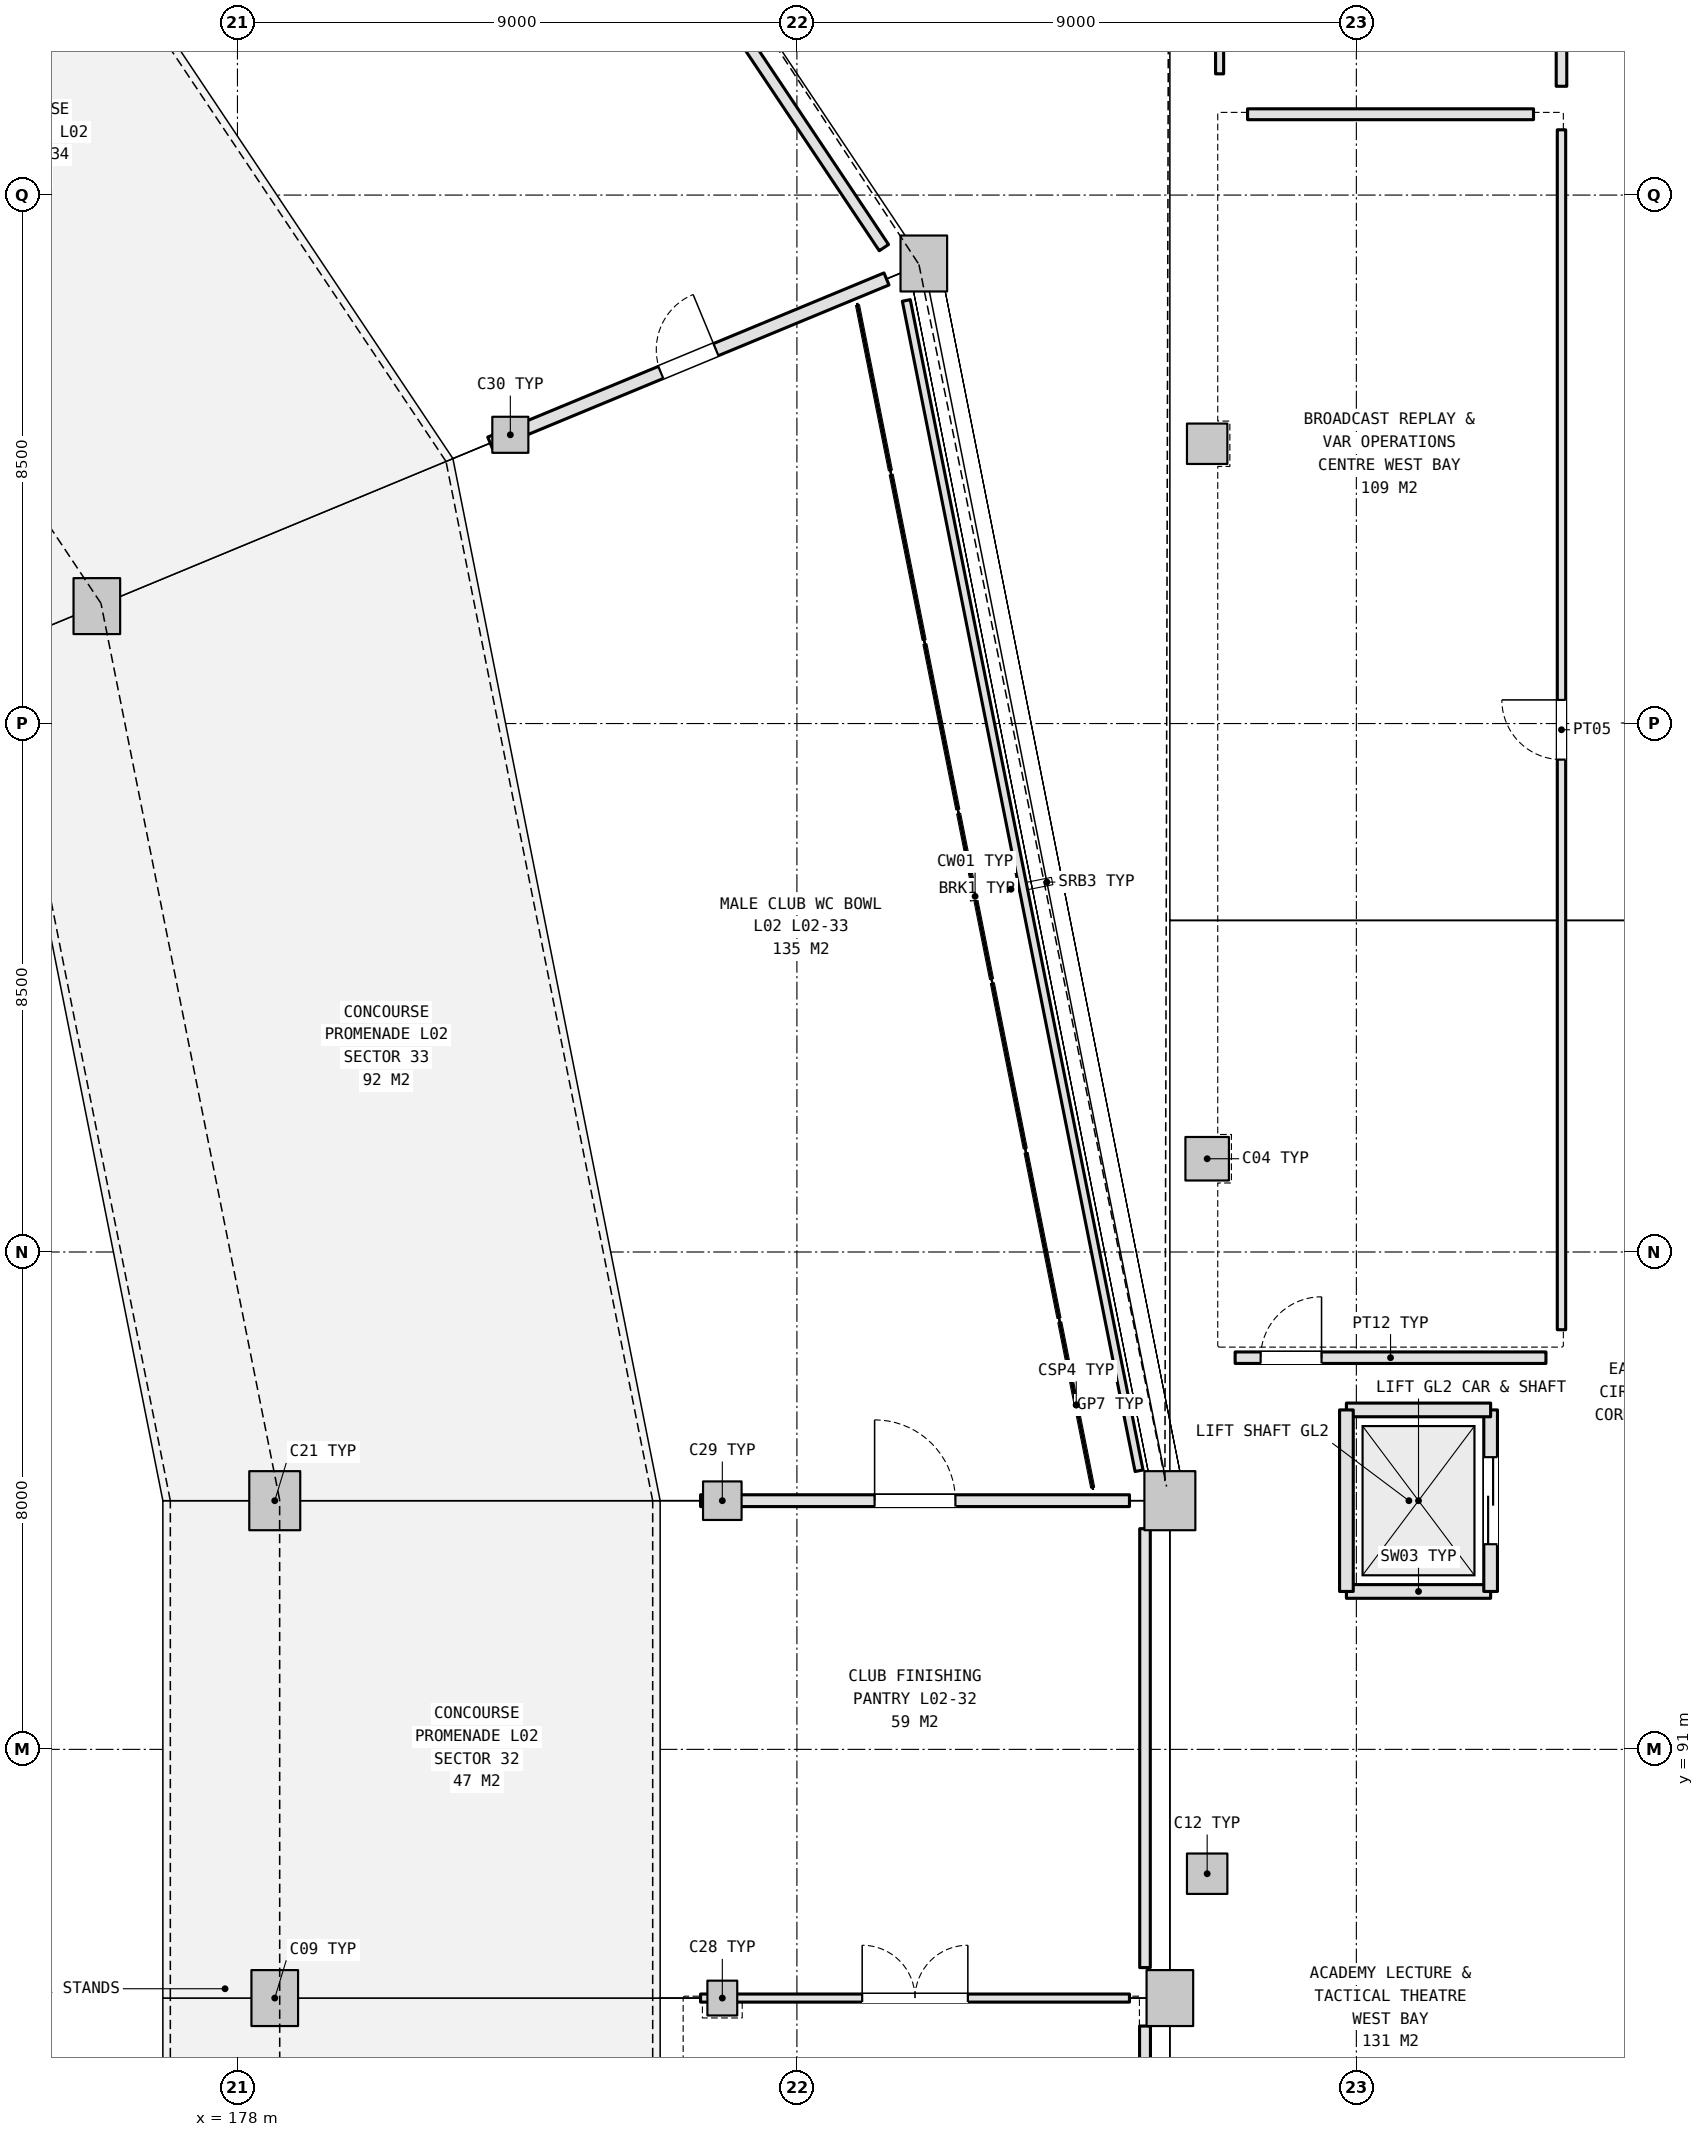
"""IFC4 building model, lengths in metres.
Left out: names, types, materials, properties, quantities, classifications, styles, units other than length and angle.
Written with IfcOpenShell. Run it as: python <this file> out.ifc"""

import sys

from ifc_helpers import new_model, si_unit, direction, frame, frame_2d, origin, origin_2d, place, context, subcontext, project, spatial, rectangle, extrude, element, fill, save


model = new_model("IFC4")
c1 = context("Model", 3, precision=1e-05, world=origin(), true_north=direction((0.0, 1.0)))
c2 = subcontext(c1, "Body", "Model", "MODEL_VIEW")
j1 = project(units=[si_unit("LENGTHUNIT", "METRE"), si_unit("PLANEANGLEUNIT", "RADIAN")], contexts=[c1])
p1 = place(None, origin())
s1 = spatial("IfcSite", under=j1, at=p1, CompositionType="ELEMENT")
p2 = place(p1, origin())
s2 = spatial("IfcBuilding", under=s1, at=p2, CompositionType="ELEMENT")
p3 = place(p2, frame((0.0, 0.0, 10.8)))
s3 = spatial("IfcBuildingStorey", under=s2, at=p3, CompositionType="ELEMENT", Elevation=10.8)
p4 = place(p3, frame((178.6, 87.0, 0.0), z_axis=(0.0, 0.0, 1.0), x_axis=(1.0, 0.0, 0.0)))
e1 = element("IfcColumn", 1, at=p4, inside=s3, PredefinedType="COLUMN", context=c2, shape_type="SweptSolid", body=[
    extrude(rectangle(XDim=0.75, YDim=0.9, at=origin_2d()), origin(), (0.0, 0.0, 1.0), 5.4),
])
p5 = place(p3, frame((185.8, 87.0, 0.0), z_axis=(0.0, 0.0, 1.0), x_axis=(1.0, 0.0, 0.0)))
e2 = element("IfcColumn", 2, at=p5, inside=s3, PredefinedType="COLUMN", context=c2, shape_type="SweptSolid", body=[
    extrude(rectangle(XDim=0.48, YDim=0.56, at=origin_2d()), origin(), (0.0, 0.0, 1.0), 5.4),
])
p6 = place(p3, frame((193.0, 87.0, 0.0), z_axis=(0.0, 0.0, 1.0), x_axis=(1.0, 0.0, 0.0)))
e3 = element("IfcColumn", 3, at=p6, inside=s3, PredefinedType="COLUMN", context=c2, shape_type="SweptSolid", body=[
    extrude(rectangle(XDim=0.75, YDim=0.9, at=origin_2d()), origin(), (0.0, 0.0, 1.0), 5.4),
])
p7 = place(p3, frame((178.6, 95.0, 0.0), z_axis=(0.0, 0.0, 1.0), x_axis=(1.0, 0.0, 0.0)))
e4 = element("IfcColumn", 4, at=p7, inside=s3, PredefinedType="COLUMN", context=c2, shape_type="SweptSolid", body=[
    extrude(rectangle(XDim=0.82, YDim=0.95, at=origin_2d()), origin(), (0.0, 0.0, 1.0), 5.4),
])
p8 = place(p3, frame((185.8, 95.0, 0.0), z_axis=(0.0, 0.0, 1.0), x_axis=(1.0, 0.0, 0.0)))
e5 = element("IfcColumn", 5, at=p8, inside=s3, PredefinedType="COLUMN", context=c2, shape_type="SweptSolid", body=[
    extrude(rectangle(XDim=0.62, YDim=0.62, at=origin_2d()), origin(), (0.0, 0.0, 1.0), 5.4),
])
p9 = place(p3, frame((193.0, 95.0, 0.0), z_axis=(0.0, 0.0, 1.0), x_axis=(1.0, 0.0, 0.0)))
e6 = element("IfcColumn", 6, at=p9, inside=s3, PredefinedType="COLUMN", context=c2, shape_type="SweptSolid", body=[
    extrude(rectangle(XDim=0.82, YDim=0.95, at=origin_2d()), origin(), (0.0, 0.0, 1.0), 5.4),
])
p10 = place(p3, frame((175.738, 109.389, 0.0), z_axis=(0.0, 0.0, 1.0), x_axis=(1.0, 0.0, 0.0)))
e7 = element("IfcColumn", 7, at=p10, inside=s3, PredefinedType="COLUMN", context=c2, shape_type="SweptSolid", body=[
    extrude(rectangle(XDim=0.75, YDim=0.9, at=origin_2d()), origin(), (0.0, 0.0, 1.0), 5.4),
])
p11 = place(p3, frame((182.39, 112.144, 0.0), z_axis=(0.0, 0.0, 1.0), x_axis=(1.0, 0.0, 0.0)))
e8 = element("IfcColumn", 8, at=p11, inside=s3, PredefinedType="COLUMN", context=c2, shape_type="SweptSolid", body=[
    extrude(rectangle(XDim=0.58, YDim=0.58, at=origin_2d()), origin(), (0.0, 0.0, 1.0), 5.4),
])
p12 = place(p3, frame((189.042, 114.9, 0.0), z_axis=(0.0, 0.0, 1.0), x_axis=(1.0, 0.0, 0.0)))
e9 = element("IfcColumn", 9, at=p12, inside=s3, PredefinedType="COLUMN", context=c2, shape_type="SweptSolid", body=[
    extrude(rectangle(XDim=0.75, YDim=0.9, at=origin_2d()), origin(), (0.0, 0.0, 1.0), 5.4),
])
p13 = place(p3, frame((193.6, 89.0, 0.0), z_axis=(0.0, 0.0, 1.0), x_axis=(1.0, 0.0, 0.0)))
e10 = element("IfcColumn", 10, at=p13, inside=s3, PredefinedType="COLUMN", context=c2, shape_type="SweptSolid", body=[
    extrude(rectangle(XDim=0.65, YDim=0.65, at=origin_2d()), origin(), (0.0, 0.0, 1.0), 5.4),
])
p14 = place(p3, frame((193.6, 100.5, 0.0), z_axis=(0.0, 0.0, 1.0), x_axis=(1.0, 0.0, 0.0)))
e11 = element("IfcColumn", 11, at=p14, inside=s3, PredefinedType="COLUMN", context=c2, shape_type="SweptSolid", body=[
    extrude(rectangle(XDim=0.7, YDim=0.7, at=origin_2d()), origin(), (0.0, 0.0, 1.0), 5.4),
])
p15 = place(p3, frame((193.6, 112.0, 0.0), z_axis=(0.0, 0.0, 1.0), x_axis=(1.0, 0.0, 0.0)))
e12 = element("IfcColumn", 12, at=p15, inside=s3, PredefinedType="COLUMN", context=c2, shape_type="SweptSolid", body=[
    extrude(rectangle(XDim=0.65, YDim=0.65, at=origin_2d()), origin(), (0.0, 0.0, 1.0), 5.4),
])
p16 = place(p3, frame((195.84, 93.54, 0.0), z_axis=(0.0, 0.0, 1.0), x_axis=(1.0, 0.0, 0.0)))
e13 = element("IfcWall", 13, at=p16, inside=s3, PredefinedType="SHEAR", context=c2, shape_type="SweptSolid", body=[
    extrude(rectangle(XDim=2.32, YDim=0.22, at=frame_2d((1.16, 0.0))), origin(), (0.0, 0.0, 1.0), 5.15),
])
p17 = place(p3, frame((198.16, 93.54, 0.0), z_axis=(0.0, 0.0, 1.0), x_axis=(0.0, 1.0, 0.0)))
e14 = element("IfcWall", 14, at=p17, inside=s3, PredefinedType="SHEAR", context=c2, shape_type="SweptSolid", body=[
    extrude(rectangle(XDim=2.92, YDim=0.22, at=frame_2d((1.46, 0.0))), origin(), (0.0, 0.0, 1.0), 5.15),
])
p18 = place(p17, frame((0.76, 0.0, 0.0)))
e15 = element("IfcOpeningElement", 15, at=p18, cuts=e14, PredefinedType="OPENING", context=c2, shape_type="SweptSolid", body=[
    extrude(rectangle(XDim=1.4, YDim=2.3, at=frame_2d((0.7, 1.15))), frame((0.0, 0.12, 0.0), z_axis=(0.0, -1.0, 0.0), x_axis=(1.0, 0.0, 0.0)), (0.0, 0.0, 1.0), 0.24),
])
p19 = place(p3, frame((198.16, 96.46, 0.0), z_axis=(0.0, 0.0, 1.0), x_axis=(-1.0, 0.0, 0.0)))
e16 = element("IfcWall", 16, at=p19, inside=s3, PredefinedType="SHEAR", context=c2, shape_type="SweptSolid", body=[
    extrude(rectangle(XDim=2.32, YDim=0.22, at=frame_2d((1.16, 0.0))), origin(), (0.0, 0.0, 1.0), 5.15),
])
p20 = place(p3, frame((195.84, 96.46, 0.0), z_axis=(0.0, 0.0, 1.0), x_axis=(0.0, -1.0, 0.0)))
e17 = element("IfcWall", 17, at=p20, inside=s3, PredefinedType="SHEAR", context=c2, shape_type="SweptSolid", body=[
    extrude(rectangle(XDim=2.92, YDim=0.22, at=frame_2d((1.46, 0.0))), origin(), (0.0, 0.0, 1.0), 5.15),
])
p21 = place(p3, frame((194.05, 97.3, 0.0), z_axis=(0.0, 0.0, 1.0), x_axis=(1.0, 0.0, 0.0)))
e18 = element("IfcWall", 18, at=p21, inside=s3, PredefinedType="PARTITIONING", context=c2, shape_type="SweptSolid", body=[
    extrude(rectangle(XDim=5.0, YDim=0.185, at=frame_2d((2.5, 0.0))), origin(), (0.0, 0.0, 1.0), 5.12),
])
p22 = place(p21, frame((0.41, 0.0, 0.0)))
e19 = element("IfcOpeningElement", 19, at=p22, cuts=e18, PredefinedType="OPENING", context=c2, shape_type="SweptSolid", body=[
    extrude(rectangle(XDim=0.98, YDim=2.15, at=frame_2d((0.49, 1.075))), frame((0.0, 0.103, 0.0), z_axis=(0.0, -1.0, 0.0), x_axis=(1.0, 0.0, 0.0)), (0.0, 0.0, 1.0), 0.205),
])
p23 = place(p3, frame((199.3, 117.05, 0.0), z_axis=(0.0, 0.0, 1.0), x_axis=(0.0, -1.0, 0.0)))
e20 = element("IfcWall", 20, at=p23, inside=s3, PredefinedType="PARTITIONING", context=c2, shape_type="SweptSolid", body=[
    extrude(rectangle(XDim=19.3, YDim=0.135, at=frame_2d((9.65, 0.0))), origin(), (0.0, 0.0, 1.0), 4.605),
])
p24 = place(p23, frame((9.17, 0.0, 0.0)))
e21 = element("IfcOpeningElement", 21, at=p24, cuts=e20, PredefinedType="OPENING", context=c2, shape_type="SweptSolid", body=[
    extrude(rectangle(XDim=0.96, YDim=2.15, at=frame_2d((0.48, 1.075))), frame((0.0, 0.077, 0.0), z_axis=(0.0, -1.0, 0.0), x_axis=(1.0, 0.0, 0.0)), (0.0, 0.0, 1.0), 0.155),
])
p25 = place(p3, frame((194.25, 117.3, 0.0), z_axis=(0.0, 0.0, 1.0), x_axis=(1.0, 0.0, 0.0)))
e22 = element("IfcWall", 22, at=p25, inside=s3, PredefinedType="PARTITIONING", context=c2, shape_type="SweptSolid", body=[
    extrude(rectangle(XDim=4.6, YDim=0.175, at=frame_2d((2.3, 0.0))), origin(), (0.0, 0.0, 1.0), 5.12),
])
p26 = place(p3, frame((199.3, 131.05, 0.0), z_axis=(0.0, 0.0, 1.0), x_axis=(0.0, -1.0, 0.0)))
e23 = element("IfcWall", 23, at=p26, inside=s3, PredefinedType="PARTITIONING", context=c2, shape_type="SweptSolid", body=[
    extrude(rectangle(XDim=13.3, YDim=0.17, at=frame_2d((6.65, 0.0))), origin(), (0.0, 0.0, 1.0), 4.605),
])
p27 = place(p26, frame((6.175, 0.0, 0.0)))
e24 = element("IfcOpeningElement", 24, at=p27, cuts=e23, PredefinedType="OPENING", context=c2, shape_type="SweptSolid", body=[
    extrude(rectangle(XDim=0.95, YDim=2.15, at=frame_2d((0.475, 1.075))), frame((0.0, 0.095, 0.0), z_axis=(0.0, -1.0, 0.0), x_axis=(1.0, 0.0, 0.0)), (0.0, 0.0, 1.0), 0.19),
])
p28 = place(p3, frame((193.8, 117.95, 0.0), z_axis=(0.0, 0.0, 1.0), x_axis=(0.0, 1.0, 0.0)))
e25 = element("IfcWall", 25, at=p28, inside=s3, PredefinedType="PARTITIONING", context=c2, shape_type="SweptSolid", body=[
    extrude(rectangle(XDim=12.9, YDim=0.13, at=frame_2d((6.45, 0.0))), origin(), (0.0, 0.0, 1.0), 4.455),
])
p29 = place(p3, frame((185.45, 87.0, 0.0), z_axis=(0.0, 0.0, 1.0), x_axis=(1.0, 0.0, 0.0)))
e26 = element("IfcWall", 26, at=p29, inside=s3, PredefinedType="PARTITIONING", context=c2, shape_type="SweptSolid", body=[
    extrude(rectangle(XDim=6.9, YDim=0.13, at=frame_2d((3.45, 0.0))), origin(), (0.0, 0.0, 1.0), 4.255),
])
p30 = place(p29, frame((2.6, 0.0, 0.0)))
e27 = element("IfcOpeningElement", 27, at=p30, cuts=e26, PredefinedType="OPENING", context=c2, shape_type="SweptSolid", body=[
    extrude(rectangle(XDim=1.7, YDim=2.25, at=frame_2d((0.85, 1.125))), frame((0.0, 0.075, 0.0), z_axis=(0.0, -1.0, 0.0), x_axis=(1.0, 0.0, 0.0)), (0.0, 0.0, 1.0), 0.15),
])
p31 = place(p3, frame((192.6, 86.55, 0.0), z_axis=(0.0, 0.0, 1.0), x_axis=(0.0, -1.0, 0.0)))
e28 = element("IfcWall", 28, at=p31, inside=s3, PredefinedType="PARTITIONING", context=c2, shape_type="SweptSolid", body=[
    extrude(rectangle(XDim=7.06, YDim=0.175, at=frame_2d((3.53, 0.0))), origin(), (0.0, 0.0, 1.0), 5.12),
])
p32 = place(p3, frame((185.45, 95.0, 0.0), z_axis=(0.0, 0.0, 1.0), x_axis=(1.0, 0.0, 0.0)))
e29 = element("IfcWall", 29, at=p32, inside=s3, PredefinedType="PARTITIONING", context=c2, shape_type="SweptSolid", body=[
    extrude(rectangle(XDim=6.9, YDim=0.19, at=frame_2d((3.45, 0.0))), origin(), (0.0, 0.0, 1.0), 4.285),
])
p33 = place(p32, frame((2.8, 0.0, 0.0)))
e30 = element("IfcOpeningElement", 30, at=p33, cuts=e29, PredefinedType="OPENING", context=c2, shape_type="SweptSolid", body=[
    extrude(rectangle(XDim=1.3, YDim=2.2, at=frame_2d((0.65, 1.1))), frame((0.0, 0.105, 0.0), z_axis=(0.0, -1.0, 0.0), x_axis=(1.0, 0.0, 0.0)), (0.0, 0.0, 1.0), 0.21),
])
p34 = place(p3, frame((192.6, 94.55, 0.0), z_axis=(0.0, 0.0, 1.0), x_axis=(0.0, -1.0, 0.0)))
e31 = element("IfcWall", 31, at=p34, inside=s3, PredefinedType="PARTITIONING", context=c2, shape_type="SweptSolid", body=[
    extrude(rectangle(XDim=7.06, YDim=0.17, at=frame_2d((3.53, 0.0))), origin(), (0.0, 0.0, 1.0), 5.12),
])
p35 = place(p3, frame((182.066, 112.01, 0.0), z_axis=(0.0, 0.0, 1.0), x_axis=(0.923873656974, 0.38269761686, 0.0)))
e32 = element("IfcWall", 32, at=p35, inside=s3, PredefinedType="PLUMBINGWALL", context=c2, shape_type="SweptSolid", body=[
    extrude(rectangle(XDim=6.9, YDim=0.21, at=frame_2d((3.45, 0.0))), origin(), (0.0, 0.0, 1.0), 4.215),
])
p36 = place(p35, frame((2.97, 0.0, 0.0)))
e33 = element("IfcOpeningElement", 33, at=p36, cuts=e32, PredefinedType="OPENING", context=c2, shape_type="SweptSolid", body=[
    extrude(rectangle(XDim=0.96, YDim=2.15, at=frame_2d((0.48, 1.075))), frame((0.0, 0.115, 0.0), z_axis=(0.0, -1.0, 0.0), x_axis=(1.0, 0.0, 0.0)), (0.0, 0.0, 1.0), 0.23),
])
p37 = place(p3, frame((188.76, 114.305, 0.0), z_axis=(0.0, 0.0, 1.0), x_axis=(0.195083697793, -0.98078659802, 0.0)))
e34 = element("IfcWall", 34, at=p37, inside=s3, PredefinedType="PARTITIONING", context=c2, shape_type="SweptSolid", body=[
    extrude(rectangle(XDim=19.192, YDim=0.13, at=frame_2d((9.596, 0.0))), origin(), (0.0, 0.0, 1.0), 5.12),
])
p38 = place(p3, frame((177.737, 131.113, 0.0), z_axis=(0.0, 0.0, 1.0), x_axis=(0.555562946988, -0.831474480627, 0.0)))
e35 = element("IfcWall", 35, at=p38, inside=s3, PredefinedType="PARTITIONING", context=c2, shape_type="SweptSolid", body=[
    extrude(rectangle(XDim=19.192, YDim=0.18, at=frame_2d((9.596, 0.0))), origin(), (0.0, 0.0, 1.0), 5.12),
])
p39 = place(p18, origin())
e36 = element("IfcDoor", 36, at=p39, inside=s3, OperationType="DOUBLE_DOOR_SLIDING", PredefinedType="DOOR", context=c2, shape_type="SweptSolid", body=[
    extrude(rectangle(XDim=1.4, YDim=2.3, at=frame_2d((0.7, 1.15))), frame((0.0, 0.025, 0.0), z_axis=(0.0, -1.0, 0.0), x_axis=(1.0, 0.0, 0.0)), (0.0, 0.0, 1.0), 0.05),
])
fill(e15, e36)
p40 = place(p22, origin())
e37 = element("IfcDoor", 37, at=p40, inside=s3, OperationType="SINGLE_SWING_RIGHT", PredefinedType="DOOR", context=c2, shape_type="SweptSolid", body=[
    extrude(rectangle(XDim=0.98, YDim=2.15, at=frame_2d((0.49, 1.075))), frame((0.0, 0.025, 0.0), z_axis=(0.0, -1.0, 0.0), x_axis=(1.0, 0.0, 0.0)), (0.0, 0.0, 1.0), 0.05),
])
fill(e19, e37)
p41 = place(p24, frame((0.96, 0.0, 0.0), z_axis=(0.0, 0.0, 1.0), x_axis=(-1.0, 0.0, 0.0)))
e38 = element("IfcDoor", 38, at=p41, inside=s3, OperationType="SINGLE_SWING_LEFT", PredefinedType="DOOR", context=c2, shape_type="SweptSolid", body=[
    extrude(rectangle(XDim=0.96, YDim=2.15, at=frame_2d((0.48, 1.075))), frame((0.0, 0.025, 0.0), z_axis=(0.0, -1.0, 0.0), x_axis=(1.0, 0.0, 0.0)), (0.0, 0.0, 1.0), 0.05),
])
fill(e21, e38)
p42 = place(p30, origin())
e39 = element("IfcDoor", 39, at=p42, inside=s3, OperationType="DOUBLE_DOOR_SINGLE_SWING", PredefinedType="DOOR", context=c2, shape_type="SweptSolid", body=[
    extrude(rectangle(XDim=1.7, YDim=2.25, at=frame_2d((0.85, 1.125))), frame((0.0, 0.025, 0.0), z_axis=(0.0, -1.0, 0.0), x_axis=(1.0, 0.0, 0.0)), (0.0, 0.0, 1.0), 0.05),
])
fill(e27, e39)
p43 = place(p33, origin())
e40 = element("IfcDoor", 40, at=p43, inside=s3, OperationType="SINGLE_SWING_LEFT", PredefinedType="DOOR", context=c2, shape_type="SweptSolid", body=[
    extrude(rectangle(XDim=1.3, YDim=2.2, at=frame_2d((0.65, 1.1))), frame((0.0, 0.025, 0.0), z_axis=(0.0, -1.0, 0.0), x_axis=(1.0, 0.0, 0.0)), (0.0, 0.0, 1.0), 0.05),
])
fill(e30, e40)
p44 = place(p36, origin())
e41 = element("IfcDoor", 41, at=p44, inside=s3, OperationType="SINGLE_SWING_RIGHT", PredefinedType="DOOR", context=c2, shape_type="SweptSolid", body=[
    extrude(rectangle(XDim=0.96, YDim=2.15, at=frame_2d((0.48, 1.075))), frame((0.0, 0.025, 0.0), z_axis=(0.0, -1.0, 0.0), x_axis=(1.0, 0.0, 0.0)), (0.0, 0.0, 1.0), 0.05),
])
fill(e33, e41)
save(model, sys.argv[1])
